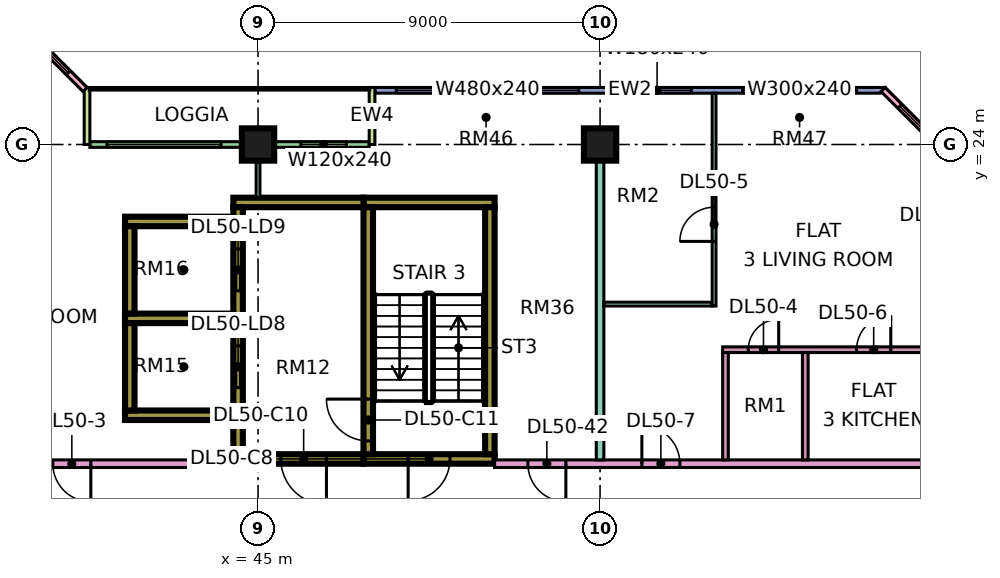
"""IFC4 building model, lengths in metres.
Left out: names, types, materials, properties, quantities, classifications, styles, units other than length and angle.
Written with IfcOpenShell. Run it as: python <this file> out.ifc"""

import sys

from ifc_helpers import new_model, si_unit, direction, frame, frame_2d, origin, origin_2d, place, context, subcontext, project, spatial, rectangle, extrude, element, fill, save


model = new_model("IFC4")
c1 = context("Model", 3, precision=1e-05, world=origin(), true_north=direction((0.0, 1.0)))
c2 = subcontext(c1, "Body", "Model", "MODEL_VIEW")
j1 = project(units=[si_unit("LENGTHUNIT", "METRE"), si_unit("PLANEANGLEUNIT", "RADIAN")], contexts=[c1])
p1 = place(None, origin())
s1 = spatial("IfcSite", under=j1, at=p1, CompositionType="ELEMENT")
p2 = place(p1, origin())
s2 = spatial("IfcBuilding", under=s1, at=p2, CompositionType="ELEMENT")
p3 = place(p2, frame((0.0, 0.0, 215.4)))
s3 = spatial("IfcBuildingStorey", under=s2, at=p3, CompositionType="ELEMENT", Elevation=215.4)
for number, where, z_axis, x_axis in (
    (1, (45.0, 24.0, 0.0), (0.0, 0.0, 1.0), (1.0, 0.0, 0.0)),
    (2, (54.0, 24.0, 0.0), (0.0, 0.0, 1.0), (1.0, 0.0, 0.0)),
):
    element("IfcColumn", number, at=place(p3, frame(where, z_axis=z_axis, x_axis=x_axis)), inside=s3, PredefinedType="COLUMN", context=c2, shape_type="SweptSolid", body=[
        extrude(rectangle(XDim=0.85, YDim=0.85, at=origin_2d()), origin(), (0.0, 0.0, 1.0), 3.75),
    ])
p4 = place(p3, frame((47.775, 15.725, 0.0), z_axis=(0.0, 0.0, 1.0), x_axis=(1.0, 0.0, 0.0)))
e3 = element("IfcWall", 3, at=p4, inside=s3, PredefinedType="SHEAR", context=c2, shape_type="SweptSolid", body=[
    extrude(rectangle(XDim=3.45, YDim=0.25, at=frame_2d((1.725, 0.0))), origin(), (0.0, 0.0, 1.0), 3.75),
])
p5 = place(p4, frame((1.175, 0.0, 0.0)))
e4 = element("IfcOpeningElement", 4, at=p5, cuts=e3, PredefinedType="OPENING", context=c2, shape_type="SweptSolid", body=[
    extrude(rectangle(XDim=1.1, YDim=2.2, at=frame_2d((0.55, 1.1))), frame((0.0, 0.135, 0.0), z_axis=(0.0, -1.0, 0.0), x_axis=(1.0, 0.0, 0.0)), (0.0, 0.0, 1.0), 0.27),
])
p6 = place(p3, frame((47.775, 22.475, 0.0), z_axis=(0.0, 0.0, 1.0), x_axis=(1.0, 0.0, 0.0)))
e5 = element("IfcWall", 5, at=p6, inside=s3, PredefinedType="SHEAR", context=c2, shape_type="SweptSolid", body=[
    extrude(rectangle(XDim=3.45, YDim=0.25, at=frame_2d((1.725, 0.0))), origin(), (0.0, 0.0, 1.0), 3.75),
])
p7 = place(p3, frame((47.9, 15.85, 0.0), z_axis=(0.0, 0.0, 1.0), x_axis=(0.0, 1.0, 0.0)))
e6 = element("IfcWall", 6, at=p7, inside=s3, PredefinedType="SHEAR", context=c2, shape_type="SweptSolid", body=[
    extrude(rectangle(XDim=6.5, YDim=0.25, at=frame_2d((3.25, 0.0))), origin(), (0.0, 0.0, 1.0), 3.75),
])
p8 = place(p7, frame((0.35, 0.0, 0.0)))
e7 = element("IfcOpeningElement", 7, at=p8, cuts=e6, PredefinedType="OPENING", context=c2, shape_type="SweptSolid", body=[
    extrude(rectangle(XDim=1.1, YDim=2.2, at=frame_2d((0.55, 1.1))), frame((0.0, 0.135, 0.0), z_axis=(0.0, -1.0, 0.0), x_axis=(1.0, 0.0, 0.0)), (0.0, 0.0, 1.0), 0.27),
])
p9 = place(p3, frame((51.1, 15.85, 0.0), z_axis=(0.0, 0.0, 1.0), x_axis=(0.0, 1.0, 0.0)))
e8 = element("IfcWall", 8, at=p9, inside=s3, PredefinedType="SHEAR", context=c2, shape_type="SweptSolid", body=[
    extrude(rectangle(XDim=6.5, YDim=0.25, at=frame_2d((3.25, 0.0))), origin(), (0.0, 0.0, 1.0), 3.75),
])
p10 = place(p3, frame((44.35, 15.725, 0.0), z_axis=(0.0, 0.0, 1.0), x_axis=(1.0, 0.0, 0.0)))
e9 = element("IfcWall", 9, at=p10, inside=s3, PredefinedType="SHEAR", context=c2, shape_type="SweptSolid", body=[
    extrude(rectangle(XDim=3.425, YDim=0.25, at=frame_2d((1.712, 0.0))), origin(), (0.0, 0.0, 1.0), 3.75),
])
p11 = place(p10, frame((1.25, 0.0, 0.0)))
e10 = element("IfcOpeningElement", 10, at=p11, cuts=e9, PredefinedType="OPENING", context=c2, shape_type="SweptSolid", body=[
    extrude(rectangle(XDim=1.2, YDim=2.2, at=frame_2d((0.6, 1.1))), frame((0.0, 0.135, 0.0), z_axis=(0.0, -1.0, 0.0), x_axis=(1.0, 0.0, 0.0)), (0.0, 0.0, 1.0), 0.27),
])
p12 = place(p3, frame((44.35, 22.475, 0.0), z_axis=(0.0, 0.0, 1.0), x_axis=(1.0, 0.0, 0.0)))
e11 = element("IfcWall", 11, at=p12, inside=s3, PredefinedType="SHEAR", context=c2, shape_type="SweptSolid", body=[
    extrude(rectangle(XDim=3.425, YDim=0.25, at=frame_2d((1.712, 0.0))), origin(), (0.0, 0.0, 1.0), 3.75),
])
p13 = place(p3, frame((44.475, 15.85, 0.0), z_axis=(0.0, 0.0, 1.0), x_axis=(0.0, 1.0, 0.0)))
e12 = element("IfcWall", 12, at=p13, inside=s3, PredefinedType="SHEAR", context=c2, shape_type="SweptSolid", body=[
    extrude(rectangle(XDim=6.5, YDim=0.25, at=frame_2d((3.25, 0.0))), origin(), (0.0, 0.0, 1.0), 3.75),
])
p14 = place(p13, frame((1.75, 0.0, 0.0)))
e13 = element("IfcOpeningElement", 13, at=p14, cuts=e12, PredefinedType="OPENING", context=c2, shape_type="SweptSolid", body=[
    extrude(rectangle(XDim=1.1, YDim=2.2, at=frame_2d((0.55, 1.1))), frame((0.0, 0.135, 0.0), z_axis=(0.0, -1.0, 0.0), x_axis=(1.0, 0.0, 0.0)), (0.0, 0.0, 1.0), 0.27),
])
p15 = place(p13, frame((4.3, 0.0, 0.0)))
e14 = element("IfcOpeningElement", 14, at=p15, cuts=e12, PredefinedType="OPENING", context=c2, shape_type="SweptSolid", body=[
    extrude(rectangle(XDim=1.1, YDim=2.2, at=frame_2d((0.55, 1.1))), frame((0.0, 0.135, 0.0), z_axis=(0.0, -1.0, 0.0), x_axis=(1.0, 0.0, 0.0)), (0.0, 0.0, 1.0), 0.27),
])
for number, where, z_axis, x_axis in (
    (15, (41.5, 16.875, 0.0), (0.0, 0.0, 1.0), (1.0, 0.0, 0.0)),
    (16, (41.5, 19.425, 0.0), (0.0, 0.0, 1.0), (1.0, 0.0, 0.0)),
    (17, (41.5, 21.975, 0.0), (0.0, 0.0, 1.0), (1.0, 0.0, 0.0)),
):
    element("IfcWall", number, at=place(p3, frame(where, z_axis=z_axis, x_axis=x_axis)), inside=s3, PredefinedType="SHEAR", context=c2, shape_type="SweptSolid", body=[
        extrude(rectangle(XDim=2.85, YDim=0.25, at=frame_2d((1.425, 0.0))), origin(), (0.0, 0.0, 1.0), 3.75),
    ])
for number, where, z_axis, x_axis in (
    (18, (41.625, 17.0, 0.0), (0.0, 0.0, 1.0), (0.0, 1.0, 0.0)),
    (19, (41.625, 19.55, 0.0), (0.0, 0.0, 1.0), (0.0, 1.0, 0.0)),
):
    element("IfcWall", number, at=place(p3, frame(where, z_axis=z_axis, x_axis=x_axis)), inside=s3, PredefinedType="SHEAR", context=c2, shape_type="SweptSolid", body=[
        extrude(rectangle(XDim=2.3, YDim=0.25, at=frame_2d((1.15, 0.0))), origin(), (0.0, 0.0, 1.0), 3.75),
    ])
p16 = place(p3, frame((61.5, 25.425, 0.0), z_axis=(0.0, 0.0, 1.0), x_axis=(-1.0, 0.0, 0.0)))
e20 = element("IfcWall", 20, at=p16, inside=s3, PredefinedType="SOLIDWALL", context=c2, shape_type="SweptSolid", body=[
    extrude(rectangle(XDim=13.425, YDim=0.15, at=frame_2d((6.712, 0.0))), origin(), (0.0, 0.0, 1.0), 3.35),
])
p17 = place(p16, frame((0.75, 0.0, 0.45)))
e21 = element("IfcOpeningElement", 21, at=p17, cuts=e20, PredefinedType="OPENING", context=c2, shape_type="SweptSolid", body=[
    extrude(rectangle(XDim=3.0, YDim=2.4, at=frame_2d((1.5, 1.2))), frame((0.0, 0.085, 0.0), z_axis=(0.0, -1.0, 0.0), x_axis=(1.0, 0.0, 0.0)), (0.0, 0.0, 1.0), 0.17),
])
p18 = place(p16, frame((5.1, 0.0, 0.45)))
e22 = element("IfcOpeningElement", 22, at=p18, cuts=e20, PredefinedType="OPENING", context=c2, shape_type="SweptSolid", body=[
    extrude(rectangle(XDim=1.8, YDim=2.4, at=frame_2d((0.9, 1.2))), frame((0.0, 0.085, 0.0), z_axis=(0.0, -1.0, 0.0), x_axis=(1.0, 0.0, 0.0)), (0.0, 0.0, 1.0), 0.17),
])
p19 = place(p16, frame((8.062, 0.0, 0.45)))
e23 = element("IfcOpeningElement", 23, at=p19, cuts=e20, PredefinedType="OPENING", context=c2, shape_type="SweptSolid", body=[
    extrude(rectangle(XDim=4.8, YDim=2.4, at=frame_2d((2.4, 1.2))), frame((0.0, 0.085, 0.0), z_axis=(0.0, -1.0, 0.0), x_axis=(1.0, 0.0, 0.0)), (0.0, 0.0, 1.0), 0.17),
])
p20 = place(p3, frame((47.925, 24.0, 0.0), z_axis=(0.0, 0.0, 1.0), x_axis=(-1.0, 0.0, 0.0)))
e24 = element("IfcWall", 24, at=p20, inside=s3, PredefinedType="SOLIDWALL", context=c2, shape_type="SweptSolid", body=[
    extrude(rectangle(XDim=7.35, YDim=0.15, at=frame_2d((3.675, 0.0))), origin(), (0.0, 0.0, 1.0), 3.35),
])
p21 = place(p20, frame((0.6, 0.0, 0.45)))
e25 = element("IfcOpeningElement", 25, at=p21, cuts=e24, PredefinedType="OPENING", context=c2, shape_type="SweptSolid", body=[
    extrude(rectangle(XDim=1.2, YDim=2.4, at=frame_2d((0.6, 1.2))), frame((0.0, 0.085, 0.0), z_axis=(0.0, -1.0, 0.0), x_axis=(1.0, 0.0, 0.0)), (0.0, 0.0, 1.0), 0.17),
])
p22 = place(p20, frame((3.9, 0.0, 0.45)))
e26 = element("IfcOpeningElement", 26, at=p22, cuts=e24, PredefinedType="OPENING", context=c2, shape_type="SweptSolid", body=[
    extrude(rectangle(XDim=3.0, YDim=2.4, at=frame_2d((1.5, 1.2))), frame((0.0, 0.085, 0.0), z_axis=(0.0, -1.0, 0.0), x_axis=(1.0, 0.0, 0.0)), (0.0, 0.0, 1.0), 0.17),
])
for number, where, z_axis, x_axis in (
    (27, (48.0, 25.5, 0.0), (0.0, 0.0, 1.0), (0.0, -1.0, 0.0)),
    (28, (40.5, 25.5, 0.0), (0.0, 0.0, 1.0), (0.0, -1.0, 0.0)),
):
    element("IfcWall", number, at=place(p3, frame(where, z_axis=z_axis, x_axis=x_axis)), inside=s3, PredefinedType="SOLIDWALL", context=c2, shape_type="SweptSolid", body=[
        extrude(rectangle(XDim=1.5, YDim=0.15, at=frame_2d((0.75, 0.0))), origin(), (0.0, 0.0, 1.0), 3.35),
    ])
p23 = place(p3, frame((40.447, 25.447, 0.0), z_axis=(0.0, 0.0, 1.0), x_axis=(-0.707106781187, 0.707106781187, 0.0)))
e29 = element("IfcWall", 29, at=p23, inside=s3, PredefinedType="SOLIDWALL", context=c2, shape_type="SweptSolid", body=[
    extrude(rectangle(XDim=4.243, YDim=0.15, at=frame_2d((2.121, 0.0))), origin(), (0.0, 0.0, 1.0), 3.35),
])
p24 = place(p23, frame((0.621, 0.0, 0.45)))
e30 = element("IfcOpeningElement", 30, at=p24, cuts=e29, PredefinedType="OPENING", context=c2, shape_type="SweptSolid", body=[
    extrude(rectangle(XDim=3.0, YDim=2.4, at=frame_2d((1.5, 1.2))), frame((0.0, 0.085, 0.0), z_axis=(0.0, -1.0, 0.0), x_axis=(1.0, 0.0, 0.0)), (0.0, 0.0, 1.0), 0.17),
])
p25 = place(p3, frame((64.447, 22.447, 0.0), z_axis=(0.0, 0.0, 1.0), x_axis=(-0.707106781187, 0.707106781187, 0.0)))
e31 = element("IfcWall", 31, at=p25, inside=s3, PredefinedType="SOLIDWALL", context=c2, shape_type="SweptSolid", body=[
    extrude(rectangle(XDim=4.243, YDim=0.15, at=frame_2d((2.121, 0.0))), origin(), (0.0, 0.0, 1.0), 3.35),
])
p26 = place(p25, frame((0.621, 0.0, 0.45)))
e32 = element("IfcOpeningElement", 32, at=p26, cuts=e31, PredefinedType="OPENING", context=c2, shape_type="SweptSolid", body=[
    extrude(rectangle(XDim=3.0, YDim=2.4, at=frame_2d((1.5, 1.2))), frame((0.0, 0.085, 0.0), z_axis=(0.0, -1.0, 0.0), x_axis=(1.0, 0.0, 0.0)), (0.0, 0.0, 1.0), 0.17),
])
p27 = place(p3, frame((34.0, 15.6, 0.0), z_axis=(0.0, 0.0, 1.0), x_axis=(1.0, 0.0, 0.0)))
e33 = element("IfcWall", 33, at=p27, inside=s3, PredefinedType="PARTITIONING", context=c2, shape_type="SweptSolid", body=[
    extrude(rectangle(XDim=10.35, YDim=0.2, at=frame_2d((5.175, 0.0))), origin(), (0.0, 0.0, 1.0), 3.35),
])
p28 = place(p27, frame((5.6, 0.0, 0.0)))
e34 = element("IfcOpeningElement", 34, at=p28, cuts=e33, PredefinedType="OPENING", context=c2, shape_type="SweptSolid", body=[
    extrude(rectangle(XDim=1.0, YDim=2.1, at=frame_2d((0.5, 1.05))), frame((0.0, 0.11, 0.0), z_axis=(0.0, -1.0, 0.0), x_axis=(1.0, 0.0, 0.0)), (0.0, 0.0, 1.0), 0.22),
])
p29 = place(p27, frame((0.45, 0.0, 0.0)))
e35 = element("IfcOpeningElement", 35, at=p29, cuts=e33, PredefinedType="OPENING", context=c2, shape_type="SweptSolid", body=[
    extrude(rectangle(XDim=1.2, YDim=2.1, at=frame_2d((0.6, 1.05))), frame((0.0, 0.11, 0.0), z_axis=(0.0, -1.0, 0.0), x_axis=(1.0, 0.0, 0.0)), (0.0, 0.0, 1.0), 0.22),
])
p30 = place(p3, frame((45.0, 22.6, 0.0), z_axis=(0.0, 0.0, 1.0), x_axis=(0.0, 1.0, 0.0)))
e36 = element("IfcWall", 36, at=p30, inside=s3, PredefinedType="PARTITIONING", context=c2, shape_type="SweptSolid", body=[
    extrude(rectangle(XDim=1.326, YDim=0.1, at=frame_2d((0.663, 0.0))), origin(), (0.0, 0.0, 1.0), 3.35),
])
p31 = place(p3, frame((51.225, 15.6, 0.0), z_axis=(0.0, 0.0, 1.0), x_axis=(1.0, 0.0, 0.0)))
e37 = element("IfcWall", 37, at=p31, inside=s3, PredefinedType="PARTITIONING", context=c2, shape_type="SweptSolid", body=[
    extrude(rectangle(XDim=11.701, YDim=0.2, at=frame_2d((5.851, 0.0))), origin(), (0.0, 0.0, 1.0), 3.35),
])
p32 = place(p31, frame((3.875, 0.0, 0.0)))
e38 = element("IfcOpeningElement", 38, at=p32, cuts=e37, PredefinedType="OPENING", context=c2, shape_type="SweptSolid", body=[
    extrude(rectangle(XDim=1.0, YDim=2.1, at=frame_2d((0.5, 1.05))), frame((0.0, 0.11, 0.0), z_axis=(0.0, -1.0, 0.0), x_axis=(1.0, 0.0, 0.0)), (0.0, 0.0, 1.0), 0.22),
])
p33 = place(p31, frame((0.875, 0.0, 0.0)))
e39 = element("IfcOpeningElement", 39, at=p33, cuts=e37, PredefinedType="OPENING", context=c2, shape_type="SweptSolid", body=[
    extrude(rectangle(XDim=1.0, YDim=2.1, at=frame_2d((0.5, 1.05))), frame((0.0, 0.11, 0.0), z_axis=(0.0, -1.0, 0.0), x_axis=(1.0, 0.0, 0.0)), (0.0, 0.0, 1.0), 0.22),
])
p34 = place(p3, frame((54.0, 15.7, 0.0), z_axis=(0.0, 0.0, 1.0), x_axis=(0.0, 1.0, 0.0)))
e40 = element("IfcWall", 40, at=p34, inside=s3, PredefinedType="PARTITIONING", context=c2, shape_type="SweptSolid", body=[
    extrude(rectangle(XDim=8.3, YDim=0.2, at=frame_2d((4.15, 0.0))), origin(), (0.0, 0.0, 1.0), 3.35),
])
p35 = place(p3, frame((54.1, 19.8, 0.0), z_axis=(0.0, 0.0, 1.0), x_axis=(1.0, 0.0, 0.0)))
e41 = element("IfcWall", 41, at=p35, inside=s3, PredefinedType="PARTITIONING", context=c2, shape_type="SweptSolid", body=[
    extrude(rectangle(XDim=2.85, YDim=0.1, at=frame_2d((1.425, 0.0))), origin(), (0.0, 0.0, 1.0), 3.35),
])
p36 = place(p3, frame((57.0, 19.75, 0.0), z_axis=(0.0, 0.0, 1.0), x_axis=(0.0, 1.0, 0.0)))
e42 = element("IfcWall", 42, at=p36, inside=s3, PredefinedType="PARTITIONING", context=c2, shape_type="SweptSolid", body=[
    extrude(rectangle(XDim=5.6, YDim=0.1, at=frame_2d((2.8, 0.0))), origin(), (0.0, 0.0, 1.0), 3.35),
])
p37 = place(p36, frame((1.7, 0.0, 0.0)))
e43 = element("IfcOpeningElement", 43, at=p37, cuts=e42, PredefinedType="OPENING", context=c2, shape_type="SweptSolid", body=[
    extrude(rectangle(XDim=0.9, YDim=2.1, at=frame_2d((0.45, 1.05))), frame((0.0, 0.06, 0.0), z_axis=(0.0, -1.0, 0.0), x_axis=(1.0, 0.0, 0.0)), (0.0, 0.0, 1.0), 0.12),
])
p38 = place(p3, frame((57.225, 18.6, 0.0), z_axis=(0.0, 0.0, 1.0), x_axis=(1.0, 0.0, 0.0)))
e44 = element("IfcWall", 44, at=p38, inside=s3, PredefinedType="PARTITIONING", context=c2, shape_type="SweptSolid", body=[
    extrude(rectangle(XDim=5.701, YDim=0.15, at=frame_2d((2.851, 0.0))), origin(), (0.0, 0.0, 1.0), 3.35),
])
p39 = place(p38, frame((0.675, 0.0, 0.0)))
e45 = element("IfcOpeningElement", 45, at=p39, cuts=e44, PredefinedType="OPENING", context=c2, shape_type="SweptSolid", body=[
    extrude(rectangle(XDim=0.8, YDim=2.1, at=frame_2d((0.4, 1.05))), frame((0.0, 0.085, 0.0), z_axis=(0.0, -1.0, 0.0), x_axis=(1.0, 0.0, 0.0)), (0.0, 0.0, 1.0), 0.17),
])
p40 = place(p38, frame((3.525, 0.0, 0.0)))
e46 = element("IfcOpeningElement", 46, at=p40, cuts=e44, PredefinedType="OPENING", context=c2, shape_type="SweptSolid", body=[
    extrude(rectangle(XDim=0.9, YDim=2.1, at=frame_2d((0.45, 1.05))), frame((0.0, 0.085, 0.0), z_axis=(0.0, -1.0, 0.0), x_axis=(1.0, 0.0, 0.0)), (0.0, 0.0, 1.0), 0.17),
])
for number, where, z_axis, x_axis in (
    (47, (57.3, 15.7, 0.0), (0.0, 0.0, 1.0), (0.0, 1.0, 0.0)),
    (48, (59.4, 15.7, 0.0), (0.0, 0.0, 1.0), (0.0, 1.0, 0.0)),
):
    element("IfcWall", number, at=place(p3, frame(where, z_axis=z_axis, x_axis=x_axis)), inside=s3, PredefinedType="PARTITIONING", context=c2, shape_type="SweptSolid", body=[
        extrude(rectangle(XDim=2.825, YDim=0.15, at=frame_2d((1.413, 0.0))), origin(), (0.0, 0.0, 1.0), 3.35),
    ])
p41 = place(p17, origin())
e49 = element("IfcWindow", 49, at=p41, inside=s3, PartitioningType="SINGLE_PANEL", PredefinedType="WINDOW", context=c2, shape_type="SweptSolid", body=[
    extrude(rectangle(XDim=3.0, YDim=2.4, at=frame_2d((1.5, 1.2))), frame((0.0, 0.03, 0.0), z_axis=(0.0, -1.0, 0.0), x_axis=(1.0, 0.0, 0.0)), (0.0, 0.0, 1.0), 0.06),
])
fill(e21, e49)
p42 = place(p18, origin())
e50 = element("IfcWindow", 50, at=p42, inside=s3, PartitioningType="SINGLE_PANEL", PredefinedType="WINDOW", context=c2, shape_type="SweptSolid", body=[
    extrude(rectangle(XDim=1.8, YDim=2.4, at=frame_2d((0.9, 1.2))), frame((0.0, 0.03, 0.0), z_axis=(0.0, -1.0, 0.0), x_axis=(1.0, 0.0, 0.0)), (0.0, 0.0, 1.0), 0.06),
])
fill(e22, e50)
p43 = place(p19, origin())
e51 = element("IfcWindow", 51, at=p43, inside=s3, PartitioningType="SINGLE_PANEL", PredefinedType="WINDOW", context=c2, shape_type="SweptSolid", body=[
    extrude(rectangle(XDim=4.8, YDim=2.4, at=frame_2d((2.4, 1.2))), frame((0.0, 0.03, 0.0), z_axis=(0.0, -1.0, 0.0), x_axis=(1.0, 0.0, 0.0)), (0.0, 0.0, 1.0), 0.06),
])
fill(e23, e51)
p44 = place(p21, origin())
e52 = element("IfcWindow", 52, at=p44, inside=s3, PartitioningType="SINGLE_PANEL", PredefinedType="WINDOW", context=c2, shape_type="SweptSolid", body=[
    extrude(rectangle(XDim=1.2, YDim=2.4, at=frame_2d((0.6, 1.2))), frame((0.0, 0.03, 0.0), z_axis=(0.0, -1.0, 0.0), x_axis=(1.0, 0.0, 0.0)), (0.0, 0.0, 1.0), 0.06),
])
fill(e25, e52)
p45 = place(p22, origin())
e53 = element("IfcWindow", 53, at=p45, inside=s3, PartitioningType="SINGLE_PANEL", PredefinedType="WINDOW", context=c2, shape_type="SweptSolid", body=[
    extrude(rectangle(XDim=3.0, YDim=2.4, at=frame_2d((1.5, 1.2))), frame((0.0, 0.03, 0.0), z_axis=(0.0, -1.0, 0.0), x_axis=(1.0, 0.0, 0.0)), (0.0, 0.0, 1.0), 0.06),
])
fill(e26, e53)
p46 = place(p24, origin())
e54 = element("IfcWindow", 54, at=p46, inside=s3, PartitioningType="SINGLE_PANEL", PredefinedType="WINDOW", context=c2, shape_type="SweptSolid", body=[
    extrude(rectangle(XDim=3.0, YDim=2.4, at=frame_2d((1.5, 1.2))), frame((0.0, 0.03, 0.0), z_axis=(0.0, -1.0, 0.0), x_axis=(1.0, 0.0, 0.0)), (0.0, 0.0, 1.0), 0.06),
])
fill(e30, e54)
p47 = place(p26, origin())
e55 = element("IfcWindow", 55, at=p47, inside=s3, PartitioningType="SINGLE_PANEL", PredefinedType="WINDOW", context=c2, shape_type="SweptSolid", body=[
    extrude(rectangle(XDim=3.0, YDim=2.4, at=frame_2d((1.5, 1.2))), frame((0.0, 0.03, 0.0), z_axis=(0.0, -1.0, 0.0), x_axis=(1.0, 0.0, 0.0)), (0.0, 0.0, 1.0), 0.06),
])
fill(e32, e55)
p48 = place(p5, frame((1.1, 0.0, 0.0), z_axis=(0.0, 0.0, 1.0), x_axis=(-1.0, 0.0, 0.0)))
e56 = element("IfcDoor", 56, at=p48, inside=s3, OperationType="SINGLE_SWING_LEFT", PredefinedType="DOOR", context=c2, shape_type="SweptSolid", body=[
    extrude(rectangle(XDim=1.1, YDim=2.2, at=frame_2d((0.55, 1.1))), frame((0.0, 0.025, 0.0), z_axis=(0.0, -1.0, 0.0), x_axis=(1.0, 0.0, 0.0)), (0.0, 0.0, 1.0), 0.05),
])
fill(e4, e56)
p49 = place(p11, origin())
e57 = element("IfcDoor", 57, at=p49, inside=s3, OperationType="SINGLE_SWING_RIGHT", PredefinedType="DOOR", context=c2, shape_type="SweptSolid", body=[
    extrude(rectangle(XDim=1.2, YDim=2.2, at=frame_2d((0.6, 1.1))), frame((0.0, 0.025, 0.0), z_axis=(0.0, -1.0, 0.0), x_axis=(1.0, 0.0, 0.0)), (0.0, 0.0, 1.0), 0.05),
])
fill(e10, e57)
p50 = place(p8, frame((1.1, 0.0, 0.0), z_axis=(0.0, 0.0, 1.0), x_axis=(-1.0, 0.0, 0.0)))
e58 = element("IfcDoor", 58, at=p50, inside=s3, OperationType="SINGLE_SWING_RIGHT", PredefinedType="DOOR", context=c2, shape_type="SweptSolid", body=[
    extrude(rectangle(XDim=1.1, YDim=2.2, at=frame_2d((0.55, 1.1))), frame((0.0, 0.025, 0.0), z_axis=(0.0, -1.0, 0.0), x_axis=(1.0, 0.0, 0.0)), (0.0, 0.0, 1.0), 0.05),
])
fill(e7, e58)
p51 = place(p14, origin())
e59 = element("IfcDoor", 59, at=p51, inside=s3, OperationType="DOUBLE_DOOR_SLIDING", PredefinedType="DOOR", context=c2, shape_type="SweptSolid", body=[
    extrude(rectangle(XDim=1.1, YDim=2.2, at=frame_2d((0.55, 1.1))), frame((0.0, 0.025, 0.0), z_axis=(0.0, -1.0, 0.0), x_axis=(1.0, 0.0, 0.0)), (0.0, 0.0, 1.0), 0.05),
])
fill(e13, e59)
p52 = place(p15, origin())
e60 = element("IfcDoor", 60, at=p52, inside=s3, OperationType="DOUBLE_DOOR_SLIDING", PredefinedType="DOOR", context=c2, shape_type="SweptSolid", body=[
    extrude(rectangle(XDim=1.1, YDim=2.2, at=frame_2d((0.55, 1.1))), frame((0.0, 0.025, 0.0), z_axis=(0.0, -1.0, 0.0), x_axis=(1.0, 0.0, 0.0)), (0.0, 0.0, 1.0), 0.05),
])
fill(e14, e60)
p53 = place(p28, origin())
e61 = element("IfcDoor", 61, at=p53, inside=s3, OperationType="SINGLE_SWING_RIGHT", PredefinedType="DOOR", context=c2, shape_type="SweptSolid", body=[
    extrude(rectangle(XDim=1.0, YDim=2.1, at=frame_2d((0.5, 1.05))), frame((0.0, 0.025, 0.0), z_axis=(0.0, -1.0, 0.0), x_axis=(1.0, 0.0, 0.0)), (0.0, 0.0, 1.0), 0.05),
])
fill(e34, e61)
p54 = place(p39, frame((0.8, 0.0, 0.0), z_axis=(0.0, 0.0, 1.0), x_axis=(-1.0, 0.0, 0.0)))
e62 = element("IfcDoor", 62, at=p54, inside=s3, OperationType="SINGLE_SWING_RIGHT", PredefinedType="DOOR", context=c2, shape_type="SweptSolid", body=[
    extrude(rectangle(XDim=0.8, YDim=2.1, at=frame_2d((0.4, 1.05))), frame((0.0, 0.025, 0.0), z_axis=(0.0, -1.0, 0.0), x_axis=(1.0, 0.0, 0.0)), (0.0, 0.0, 1.0), 0.05),
])
fill(e45, e62)
p55 = place(p37, origin())
e63 = element("IfcDoor", 63, at=p55, inside=s3, OperationType="SINGLE_SWING_LEFT", PredefinedType="DOOR", context=c2, shape_type="SweptSolid", body=[
    extrude(rectangle(XDim=0.9, YDim=2.1, at=frame_2d((0.45, 1.05))), frame((0.0, 0.025, 0.0), z_axis=(0.0, -1.0, 0.0), x_axis=(1.0, 0.0, 0.0)), (0.0, 0.0, 1.0), 0.05),
])
fill(e43, e63)
p56 = place(p40, frame((0.9, 0.0, 0.0), z_axis=(0.0, 0.0, 1.0), x_axis=(-1.0, 0.0, 0.0)))
e64 = element("IfcDoor", 64, at=p56, inside=s3, OperationType="SINGLE_SWING_RIGHT", PredefinedType="DOOR", context=c2, shape_type="SweptSolid", body=[
    extrude(rectangle(XDim=0.9, YDim=2.1, at=frame_2d((0.45, 1.05))), frame((0.0, 0.025, 0.0), z_axis=(0.0, -1.0, 0.0), x_axis=(1.0, 0.0, 0.0)), (0.0, 0.0, 1.0), 0.05),
])
fill(e46, e64)
p57 = place(p32, origin())
e65 = element("IfcDoor", 65, at=p57, inside=s3, OperationType="SINGLE_SWING_LEFT", PredefinedType="DOOR", context=c2, shape_type="SweptSolid", body=[
    extrude(rectangle(XDim=1.0, YDim=2.1, at=frame_2d((0.5, 1.05))), frame((0.0, 0.025, 0.0), z_axis=(0.0, -1.0, 0.0), x_axis=(1.0, 0.0, 0.0)), (0.0, 0.0, 1.0), 0.05),
])
fill(e38, e65)
p58 = place(p33, origin())
e66 = element("IfcDoor", 66, at=p58, inside=s3, OperationType="SINGLE_SWING_RIGHT", PredefinedType="DOOR", context=c2, shape_type="SweptSolid", body=[
    extrude(rectangle(XDim=1.0, YDim=2.1, at=frame_2d((0.5, 1.05))), frame((0.0, 0.025, 0.0), z_axis=(0.0, -1.0, 0.0), x_axis=(1.0, 0.0, 0.0)), (0.0, 0.0, 1.0), 0.05),
])
fill(e39, e66)
save(model, sys.argv[1])
